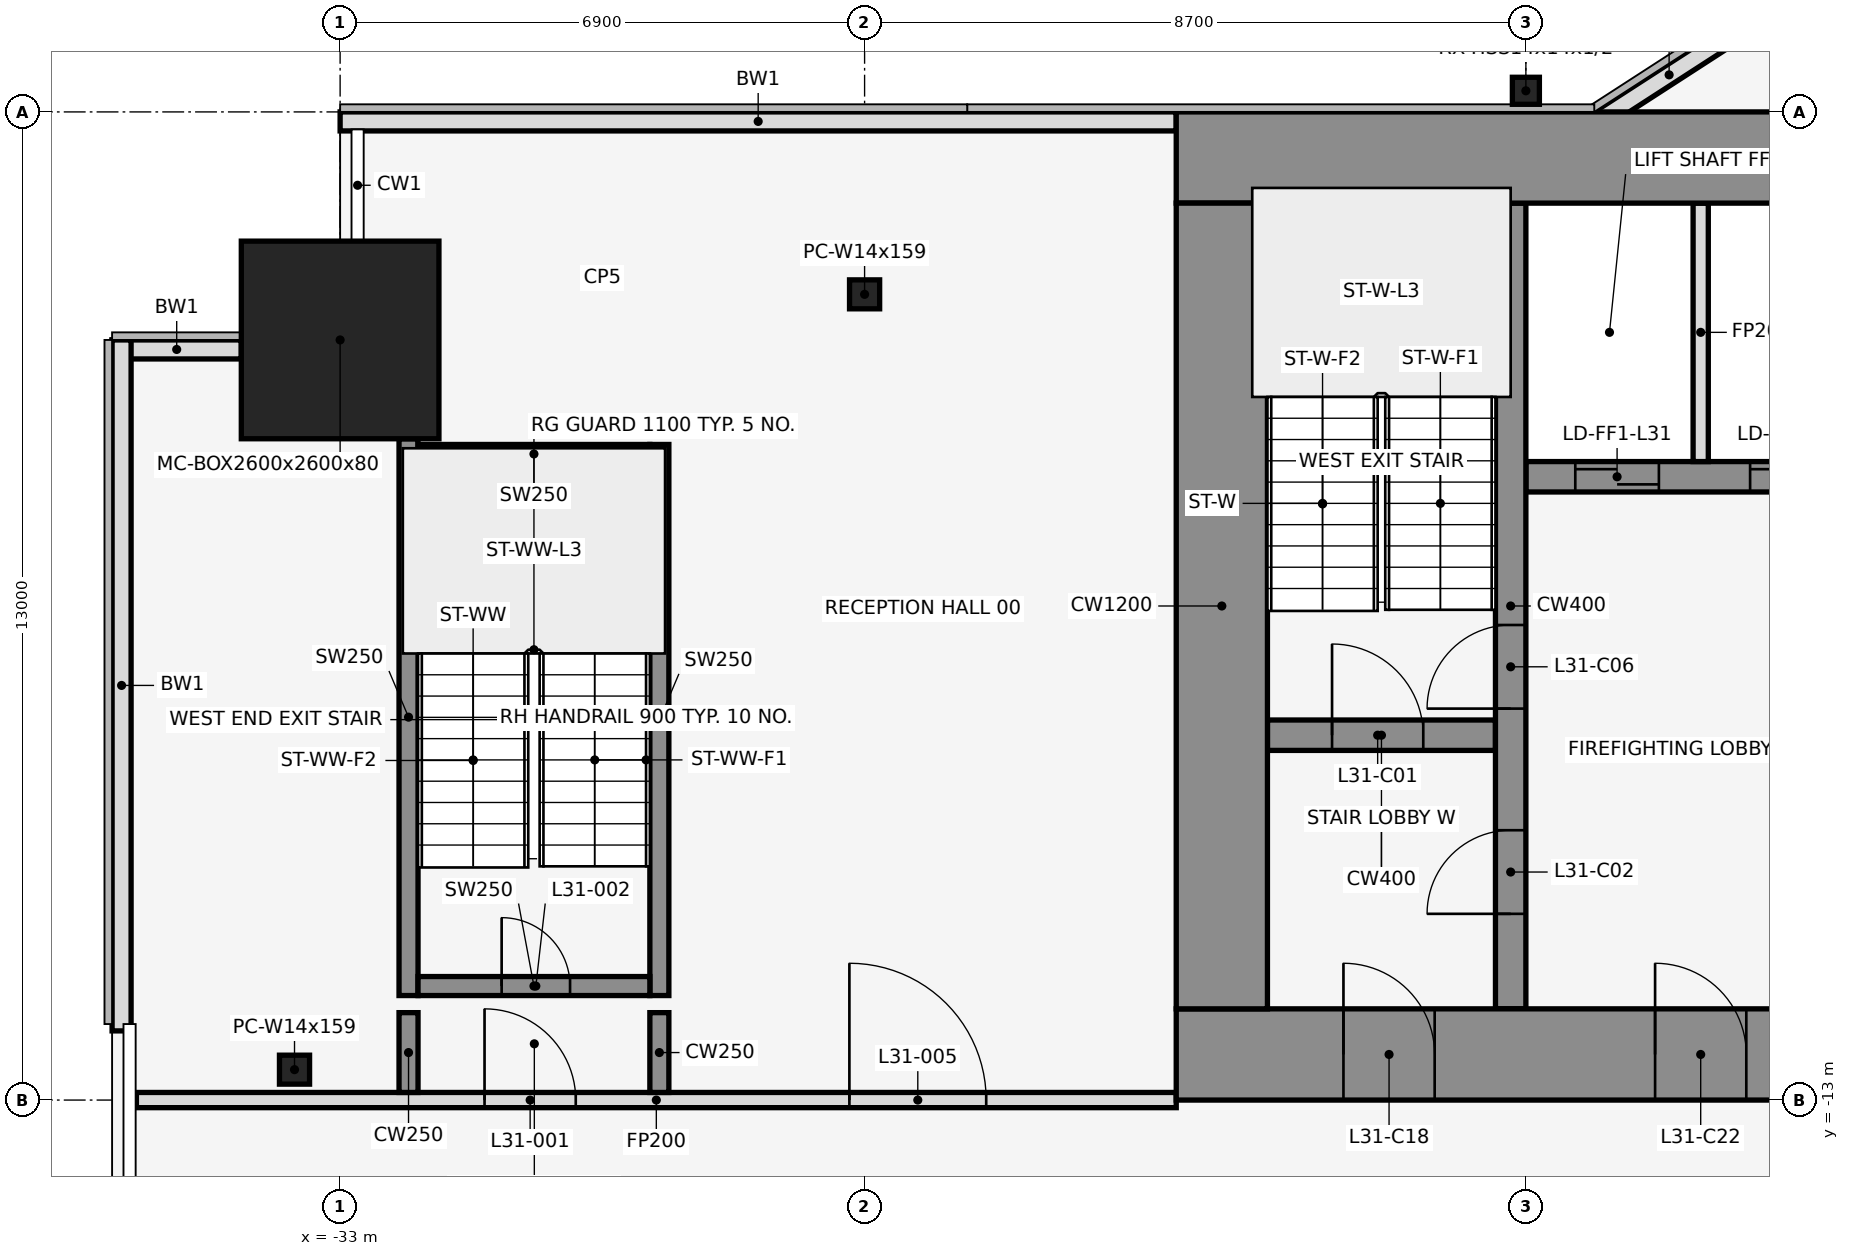
"""IFC4 building model, lengths in metres.
Left out: names, types, materials, properties, quantities, classifications, styles, units other than length and angle.
Written with IfcOpenShell. Run it as: python <this file> out.ifc"""

import sys

from ifc_helpers import new_model, si_unit, direction, frame, frame_2d, origin, origin_2d, place, context, subcontext, project, spatial, rectangle, hollow_rectangle, i_section, extrude, element, fill, save


model = new_model("IFC4")
c1 = context("Model", 3, precision=1e-05, world=origin(), true_north=direction((0.0, 1.0)))
c2 = subcontext(c1, "Body", "Model", "MODEL_VIEW")
j1 = project(units=[si_unit("LENGTHUNIT", "METRE"), si_unit("PLANEANGLEUNIT", "RADIAN")], contexts=[c1])
p1 = place(None, origin())
s1 = spatial("IfcSite", under=j1, at=p1, CompositionType="ELEMENT")
p2 = place(p1, origin())
s2 = spatial("IfcBuilding", under=s1, at=p2, CompositionType="ELEMENT")
p3 = place(p2, frame((0.0, 0.0, 144.5)))
s3 = spatial("IfcBuildingStorey", under=s2, at=p3, CompositionType="ELEMENT", Elevation=144.5)
p4 = place(p3, frame((-33.0, -3.0, 0.0), z_axis=(0.0, 0.0, 1.0), x_axis=(1.0, 0.0, 0.0)))
e1 = element("IfcColumn", 1, at=p4, inside=s3, PredefinedType="COLUMN", context=c2, shape_type="SweptSolid", body=[
    extrude(hollow_rectangle(XDim=2.6, YDim=2.6, WallThickness=0.08, at=origin_2d()), origin(), (0.0, 0.0, 1.0), 4.1),
])
p5 = place(p3, frame((-26.1, -2.4, 0.0), z_axis=(0.0, 0.0, 1.0), x_axis=(1.0, 0.0, 0.0)))
e2 = element("IfcColumn", 2, at=p5, inside=s3, PredefinedType="COLUMN", context=c2, shape_type="SweptSolid", body=[
    extrude(i_section(OverallWidth=0.396, OverallDepth=0.381, WebThickness=0.019, FlangeThickness=0.03, at=origin_2d()), origin(), (0.0, 0.0, 1.0), 4.1),
])
p6 = place(p3, frame((-17.4, 0.278, 0.0), z_axis=(0.0, 0.0, 1.0), x_axis=(1.0, 0.0, 0.0)))
e3 = element("IfcColumn", 3, at=p6, inside=s3, PredefinedType="COLUMN", context=c2, shape_type="SweptSolid", body=[
    extrude(hollow_rectangle(XDim=0.356, YDim=0.356, WallThickness=0.012, at=origin_2d()), origin(), (0.0, 0.0, 1.0), 4.1),
])
p7 = place(p3, frame((-33.6, -12.6, 0.0), z_axis=(0.0, 0.0, 1.0), x_axis=(1.0, 0.0, 0.0)))
e4 = element("IfcColumn", 4, at=p7, inside=s3, PredefinedType="COLUMN", context=c2, shape_type="SweptSolid", body=[
    extrude(i_section(OverallWidth=0.396, OverallDepth=0.381, WebThickness=0.019, FlangeThickness=0.03, at=origin_2d()), origin(), (0.0, 0.0, 1.0), 4.1),
])
p8 = place(p3, frame((-14.599, 1.08, 0.0), z_axis=(0.0, 0.0, 1.0), x_axis=(-0.83981312244, -0.542875602121, 0.0)))
e5 = element("IfcWall", 5, at=p8, inside=s3, PredefinedType="STANDARD", context=c2, shape_type="SweptSolid", body=[
    extrude(rectangle(XDim=2.183, YDim=0.25, at=frame_2d((1.091, 0.0))), origin(), (0.0, 0.0, 1.0), 3.95),
])
p9 = place(p3, frame((-22.0, -0.125, 0.0), z_axis=(0.0, 0.0, 1.0), x_axis=(-1.0, 0.0, 0.0)))
e6 = element("IfcWall", 6, at=p9, inside=s3, PredefinedType="STANDARD", context=c2, shape_type="SweptSolid", body=[
    extrude(rectangle(XDim=11.0, YDim=0.25, at=frame_2d((5.5, 0.0))), origin(), (0.0, 0.0, 1.0), 3.95),
])
p10 = place(p3, frame((-34.3, -3.125, 0.0), z_axis=(0.0, 0.0, 1.0), x_axis=(-1.0, 0.0, 0.0)))
e7 = element("IfcWall", 7, at=p10, inside=s3, PredefinedType="STANDARD", context=c2, shape_type="SweptSolid", body=[
    extrude(rectangle(XDim=1.7, YDim=0.25, at=frame_2d((0.85, 0.0))), origin(), (0.0, 0.0, 1.0), 3.95),
])
p11 = place(p3, frame((-35.875, -3.0, 0.0), z_axis=(0.0, 0.0, 1.0), x_axis=(0.0, -1.0, 0.0)))
e8 = element("IfcWall", 8, at=p11, inside=s3, PredefinedType="STANDARD", context=c2, shape_type="SweptSolid", body=[
    extrude(rectangle(XDim=9.09, YDim=0.25, at=frame_2d((4.545, 0.0))), origin(), (0.0, 0.0, 1.0), 3.95),
])
p12 = place(p3, frame((-32.1, -11.625, 0.0), z_axis=(0.0, 0.0, 1.0), x_axis=(0.0, 1.0, 0.0)))
e9 = element("IfcWall", 9, at=p12, inside=s3, PredefinedType="SHEAR", context=c2, shape_type="SweptSolid", body=[
    extrude(rectangle(XDim=7.325, YDim=0.25, at=frame_2d((3.663, 0.0))), origin(), (0.0, 0.0, 1.0), 4.1),
])
p13 = place(p3, frame((-28.8, -11.625, 0.0), z_axis=(0.0, 0.0, 1.0), x_axis=(0.0, 1.0, 0.0)))
e10 = element("IfcWall", 10, at=p13, inside=s3, PredefinedType="SHEAR", context=c2, shape_type="SweptSolid", body=[
    extrude(rectangle(XDim=7.25, YDim=0.25, at=frame_2d((3.625, 0.0))), origin(), (0.0, 0.0, 1.0), 4.1),
])
p14 = place(p3, frame((-31.975, -11.5, 0.0), z_axis=(0.0, 0.0, 1.0), x_axis=(1.0, 0.0, 0.0)))
e11 = element("IfcWall", 11, at=p14, inside=s3, PredefinedType="SHEAR", context=c2, shape_type="SweptSolid", body=[
    extrude(rectangle(XDim=3.05, YDim=0.25, at=frame_2d((1.525, 0.0))), origin(), (0.0, 0.0, 1.0), 4.1),
])
p15 = place(p14, frame((1.1, 0.0, 0.0)))
e12 = element("IfcOpeningElement", 12, at=p15, cuts=e11, PredefinedType="OPENING", context=c2, shape_type="SweptSolid", body=[
    extrude(rectangle(XDim=0.9, YDim=2.1, at=frame_2d((0.45, 1.05))), frame((0.0, 0.137, 0.0), z_axis=(0.0, -1.0, 0.0), x_axis=(1.0, 0.0, 0.0)), (0.0, 0.0, 1.0), 0.274),
])
p16 = place(p3, frame((-31.975, -4.5, 0.0), z_axis=(0.0, 0.0, 1.0), x_axis=(1.0, 0.0, 0.0)))
e13 = element("IfcWall", 13, at=p16, inside=s3, PredefinedType="SHEAR", context=c2, shape_type="SweptSolid", body=[
    extrude(rectangle(XDim=3.05, YDim=0.25, at=frame_2d((1.525, 0.0))), origin(), (0.0, 0.0, 1.0), 4.1),
])
p17 = place(p3, frame((-35.68, -13.0, 0.0), z_axis=(0.0, 0.0, 1.0), x_axis=(1.0, 0.0, 0.0)))
e14 = element("IfcWall", 14, at=p17, inside=s3, PredefinedType="PARTITIONING", context=c2, shape_type="SweptSolid", body=[
    extrude(rectangle(XDim=13.68, YDim=0.2, at=frame_2d((6.84, 0.0))), origin(), (0.0, 0.0, 1.0), 2.84),
])
p18 = place(p17, frame((4.58, 0.0, 0.0)))
e15 = element("IfcOpeningElement", 15, at=p18, cuts=e14, PredefinedType="OPENING", context=c2, shape_type="SweptSolid", body=[
    extrude(rectangle(XDim=1.2, YDim=2.1, at=frame_2d((0.6, 1.05))), frame((0.0, 0.112, 0.0), z_axis=(0.0, -1.0, 0.0), x_axis=(1.0, 0.0, 0.0)), (0.0, 0.0, 1.0), 0.224),
])
p19 = place(p17, frame((9.38, 0.0, 0.0)))
e16 = element("IfcOpeningElement", 16, at=p19, cuts=e14, PredefinedType="OPENING", context=c2, shape_type="SweptSolid", body=[
    extrude(rectangle(XDim=1.8, YDim=2.1, at=frame_2d((0.9, 1.05))), frame((0.0, 0.112, 0.0), z_axis=(0.0, -1.0, 0.0), x_axis=(1.0, 0.0, 0.0)), (0.0, 0.0, 1.0), 0.224),
])
for number, where, z_axis, x_axis in (
    (17, (-32.1, -12.9, 0.0), (0.0, 0.0, 1.0), (0.0, 1.0, 0.0)),
    (18, (-28.8, -12.9, 0.0), (0.0, 0.0, 1.0), (0.0, 1.0, 0.0)),
):
    element("IfcWall", number, at=place(p3, frame(where, z_axis=z_axis, x_axis=x_axis)), inside=s3, PredefinedType="SHEAR", context=c2, shape_type="SweptSolid", body=[
        extrude(rectangle(XDim=1.05, YDim=0.25, at=frame_2d((0.525, 0.0))), origin(), (0.0, 0.0, 1.0), 4.1),
    ])
p20 = place(p3, frame((-20.8, -8.2, 0.0), z_axis=(0.0, 0.0, 1.0), x_axis=(1.0, 0.0, 0.0)))
e19 = element("IfcWall", 19, at=p20, inside=s3, PredefinedType="SHEAR", context=c2, shape_type="SweptSolid", body=[
    extrude(rectangle(XDim=3.0, YDim=0.4, at=frame_2d((1.5, 0.0))), origin(), (0.0, 0.0, 1.0), 4.1),
])
p21 = place(p20, frame((0.85, 0.0, 0.0)))
e20 = element("IfcOpeningElement", 20, at=p21, cuts=e19, PredefinedType="OPENING", context=c2, shape_type="SweptSolid", body=[
    extrude(rectangle(XDim=1.2, YDim=2.1, at=frame_2d((0.6, 1.05))), frame((0.0, 0.212, 0.0), z_axis=(0.0, -1.0, 0.0), x_axis=(1.0, 0.0, 0.0)), (0.0, 0.0, 1.0), 0.424),
])
p22 = place(p3, frame((-17.4, -4.8, 0.0), z_axis=(0.0, 0.0, 1.0), x_axis=(1.0, 0.0, 0.0)))
e21 = element("IfcWall", 21, at=p22, inside=s3, PredefinedType="SHEAR", context=c2, shape_type="SweptSolid", body=[
    extrude(rectangle(XDim=13.6, YDim=0.4, at=frame_2d((6.8, 0.0))), origin(), (0.0, 0.0, 1.0), 4.1),
])
p23 = place(p22, frame((0.65, 0.0, 0.0)))
e22 = element("IfcOpeningElement", 22, at=p23, cuts=e21, PredefinedType="OPENING", context=c2, shape_type="SweptSolid", body=[
    extrude(rectangle(XDim=1.1, YDim=2.1, at=frame_2d((0.55, 1.05))), frame((0.0, 0.212, 0.0), z_axis=(0.0, -1.0, 0.0), x_axis=(1.0, 0.0, 0.0)), (0.0, 0.0, 1.0), 0.424),
])
p24 = place(p22, frame((2.95, 0.0, 0.0)))
e23 = element("IfcOpeningElement", 23, at=p24, cuts=e21, PredefinedType="OPENING", context=c2, shape_type="SweptSolid", body=[
    extrude(rectangle(XDim=1.1, YDim=2.1, at=frame_2d((0.55, 1.05))), frame((0.0, 0.212, 0.0), z_axis=(0.0, -1.0, 0.0), x_axis=(1.0, 0.0, 0.0)), (0.0, 0.0, 1.0), 0.424),
])
p25 = place(p22, frame((8.75, 0.0, 0.0)))
e24 = element("IfcOpeningElement", 24, at=p25, cuts=e21, PredefinedType="OPENING", context=c2, shape_type="SweptSolid", body=[
    extrude(rectangle(XDim=0.9, YDim=2.1, at=frame_2d((0.45, 1.05))), frame((0.0, 0.212, 0.0), z_axis=(0.0, -1.0, 0.0), x_axis=(1.0, 0.0, 0.0)), (0.0, 0.0, 1.0), 0.424),
])
p26 = place(p3, frame((-17.6, -11.8, 0.0), z_axis=(0.0, 0.0, 1.0), x_axis=(0.0, 1.0, 0.0)))
e25 = element("IfcWall", 25, at=p26, inside=s3, PredefinedType="SHEAR", context=c2, shape_type="SweptSolid", body=[
    extrude(rectangle(XDim=10.6, YDim=0.4, at=frame_2d((5.3, 0.0))), origin(), (0.0, 0.0, 1.0), 4.1),
])
p27 = place(p26, frame((1.25, 0.0, 0.0)))
e26 = element("IfcOpeningElement", 26, at=p27, cuts=e25, PredefinedType="OPENING", context=c2, shape_type="SweptSolid", body=[
    extrude(rectangle(XDim=1.1, YDim=2.1, at=frame_2d((0.55, 1.05))), frame((0.0, 0.212, 0.0), z_axis=(0.0, -1.0, 0.0), x_axis=(1.0, 0.0, 0.0)), (0.0, 0.0, 1.0), 0.424),
])
p28 = place(p26, frame((3.95, 0.0, 0.0)))
e27 = element("IfcOpeningElement", 27, at=p28, cuts=e25, PredefinedType="OPENING", context=c2, shape_type="SweptSolid", body=[
    extrude(rectangle(XDim=1.1, YDim=2.1, at=frame_2d((0.55, 1.05))), frame((0.0, 0.212, 0.0), z_axis=(0.0, -1.0, 0.0), x_axis=(1.0, 0.0, 0.0)), (0.0, 0.0, 1.0), 0.424),
])
p29 = place(p3, frame((-15.1, -4.6, 0.0), z_axis=(0.0, 0.0, 1.0), x_axis=(0.0, 1.0, 0.0)))
e28 = element("IfcWall", 28, at=p29, inside=s3, PredefinedType="PARTITIONING", context=c2, shape_type="SweptSolid", body=[
    extrude(rectangle(XDim=3.4, YDim=0.2, at=frame_2d((1.7, 0.0))), origin(), (0.0, 0.0, 1.0), 2.84),
])
p30 = place(p3, frame((-22.0, -0.6, 0.0), z_axis=(0.0, 0.0, 1.0), x_axis=(1.0, 0.0, 0.0)))
e29 = element("IfcWall", 29, at=p30, inside=s3, PredefinedType="SHEAR", context=c2, shape_type="SweptSolid", body=[
    extrude(rectangle(XDim=44.0, YDim=1.2, at=frame_2d((22.0, 0.0))), origin(), (0.0, 0.0, 1.0), 4.1),
])
p31 = place(p30, frame((18.55, 0.0, 0.0)))
e30 = element("IfcOpeningElement", 30, at=p31, cuts=e29, PredefinedType="OPENING", context=c2, shape_type="SweptSolid", body=[
    extrude(rectangle(XDim=0.9, YDim=2.1, at=frame_2d((0.45, 1.05))), frame((0.0, 0.612, 0.0), z_axis=(0.0, -1.0, 0.0), x_axis=(1.0, 0.0, 0.0)), (0.0, 0.0, 1.0), 1.224),
])
p32 = place(p30, frame((24.55, 0.0, 0.0)))
e31 = element("IfcOpeningElement", 31, at=p32, cuts=e29, PredefinedType="OPENING", context=c2, shape_type="SweptSolid", body=[
    extrude(rectangle(XDim=0.9, YDim=2.1, at=frame_2d((0.45, 1.05))), frame((0.0, 0.612, 0.0), z_axis=(0.0, -1.0, 0.0), x_axis=(1.0, 0.0, 0.0)), (0.0, 0.0, 1.0), 1.224),
])
p33 = place(p3, frame((-22.0, -12.4, 0.0), z_axis=(0.0, 0.0, 1.0), x_axis=(1.0, 0.0, 0.0)))
e32 = element("IfcWall", 32, at=p33, inside=s3, PredefinedType="SHEAR", context=c2, shape_type="SweptSolid", body=[
    extrude(rectangle(XDim=44.0, YDim=1.2, at=frame_2d((22.0, 0.0))), origin(), (0.0, 0.0, 1.0), 4.1),
])
p34 = place(p33, frame((2.2, 0.0, 0.0)))
e33 = element("IfcOpeningElement", 33, at=p34, cuts=e32, PredefinedType="OPENING", context=c2, shape_type="SweptSolid", body=[
    extrude(rectangle(XDim=1.2, YDim=2.1, at=frame_2d((0.6, 1.05))), frame((0.0, 0.612, 0.0), z_axis=(0.0, -1.0, 0.0), x_axis=(1.0, 0.0, 0.0)), (0.0, 0.0, 1.0), 1.224),
])
p35 = place(p33, frame((21.4, 0.0, 0.0)))
e34 = element("IfcOpeningElement", 34, at=p35, cuts=e32, PredefinedType="OPENING", context=c2, shape_type="SweptSolid", body=[
    extrude(rectangle(XDim=1.2, YDim=2.1, at=frame_2d((0.6, 1.05))), frame((0.0, 0.612, 0.0), z_axis=(0.0, -1.0, 0.0), x_axis=(1.0, 0.0, 0.0)), (0.0, 0.0, 1.0), 1.224),
])
p36 = place(p33, frame((40.6, 0.0, 0.0)))
e35 = element("IfcOpeningElement", 35, at=p36, cuts=e32, PredefinedType="OPENING", context=c2, shape_type="SweptSolid", body=[
    extrude(rectangle(XDim=1.2, YDim=2.1, at=frame_2d((0.6, 1.05))), frame((0.0, 0.612, 0.0), z_axis=(0.0, -1.0, 0.0), x_axis=(1.0, 0.0, 0.0)), (0.0, 0.0, 1.0), 1.224),
])
p37 = place(p33, frame((16.0, 0.0, 0.0)))
e36 = element("IfcOpeningElement", 36, at=p37, cuts=e32, PredefinedType="OPENING", context=c2, shape_type="SweptSolid", body=[
    extrude(rectangle(XDim=1.8, YDim=2.1, at=frame_2d((0.9, 1.05))), frame((0.0, 0.612, 0.0), z_axis=(0.0, -1.0, 0.0), x_axis=(1.0, 0.0, 0.0)), (0.0, 0.0, 1.0), 1.224),
])
p38 = place(p33, frame((6.3, 0.0, 0.0)))
e37 = element("IfcOpeningElement", 37, at=p38, cuts=e32, PredefinedType="OPENING", context=c2, shape_type="SweptSolid", body=[
    extrude(rectangle(XDim=1.2, YDim=2.1, at=frame_2d((0.6, 1.05))), frame((0.0, 0.612, 0.0), z_axis=(0.0, -1.0, 0.0), x_axis=(1.0, 0.0, 0.0)), (0.0, 0.0, 1.0), 1.224),
])
p39 = place(p33, frame((26.2, 0.0, 0.0)))
e38 = element("IfcOpeningElement", 38, at=p39, cuts=e32, PredefinedType="OPENING", context=c2, shape_type="SweptSolid", body=[
    extrude(rectangle(XDim=1.8, YDim=2.1, at=frame_2d((0.9, 1.05))), frame((0.0, 0.612, 0.0), z_axis=(0.0, -1.0, 0.0), x_axis=(1.0, 0.0, 0.0)), (0.0, 0.0, 1.0), 1.224),
])
p40 = place(p33, frame((36.5, 0.0, 0.0)))
e39 = element("IfcOpeningElement", 39, at=p40, cuts=e32, PredefinedType="OPENING", context=c2, shape_type="SweptSolid", body=[
    extrude(rectangle(XDim=1.2, YDim=2.1, at=frame_2d((0.6, 1.05))), frame((0.0, 0.612, 0.0), z_axis=(0.0, -1.0, 0.0), x_axis=(1.0, 0.0, 0.0)), (0.0, 0.0, 1.0), 1.224),
])
p41 = place(p3, frame((-21.4, -11.8, 0.0), z_axis=(0.0, 0.0, 1.0), x_axis=(0.0, 1.0, 0.0)))
e40 = element("IfcWall", 40, at=p41, inside=s3, PredefinedType="SHEAR", context=c2, shape_type="SweptSolid", body=[
    extrude(rectangle(XDim=10.6, YDim=1.2, at=frame_2d((5.3, 0.0))), origin(), (0.0, 0.0, 1.0), 4.1),
])
p42 = place(p18, origin())
e41 = element("IfcDoor", 41, at=p42, inside=s3, OperationType="SINGLE_SWING_LEFT", PredefinedType="DOOR", context=c2, shape_type="SweptSolid", body=[
    extrude(rectangle(XDim=1.2, YDim=2.1, at=frame_2d((0.6, 1.05))), frame((0.0, 0.025, 0.0), z_axis=(0.0, -1.0, 0.0), x_axis=(1.0, 0.0, 0.0)), (0.0, 0.0, 1.0), 0.05),
])
fill(e15, e41)
p43 = place(p15, origin())
e42 = element("IfcDoor", 42, at=p43, inside=s3, OperationType="SINGLE_SWING_LEFT", PredefinedType="DOOR", context=c2, shape_type="SweptSolid", body=[
    extrude(rectangle(XDim=0.9, YDim=2.1, at=frame_2d((0.45, 1.05))), frame((0.0, 0.025, 0.0), z_axis=(0.0, -1.0, 0.0), x_axis=(1.0, 0.0, 0.0)), (0.0, 0.0, 1.0), 0.05),
])
fill(e12, e42)
p44 = place(p19, origin())
e43 = element("IfcDoor", 43, at=p44, inside=s3, OperationType="SINGLE_SWING_LEFT", PredefinedType="DOOR", context=c2, shape_type="SweptSolid", body=[
    extrude(rectangle(XDim=1.8, YDim=2.1, at=frame_2d((0.9, 1.05))), frame((0.0, 0.025, 0.0), z_axis=(0.0, -1.0, 0.0), x_axis=(1.0, 0.0, 0.0)), (0.0, 0.0, 1.0), 0.05),
])
fill(e16, e43)
p45 = place(p21, origin())
e44 = element("IfcDoor", 44, at=p45, inside=s3, OperationType="SINGLE_SWING_LEFT", PredefinedType="DOOR", context=c2, shape_type="SweptSolid", body=[
    extrude(rectangle(XDim=1.2, YDim=2.1, at=frame_2d((0.6, 1.05))), frame((0.0, 0.025, 0.0), z_axis=(0.0, -1.0, 0.0), x_axis=(1.0, 0.0, 0.0)), (0.0, 0.0, 1.0), 0.05),
])
fill(e20, e44)
p46 = place(p27, frame((1.1, 0.0, 0.0), z_axis=(0.0, 0.0, 1.0), x_axis=(-1.0, 0.0, 0.0)))
e45 = element("IfcDoor", 45, at=p46, inside=s3, OperationType="SINGLE_SWING_LEFT", PredefinedType="DOOR", context=c2, shape_type="SweptSolid", body=[
    extrude(rectangle(XDim=1.1, YDim=2.1, at=frame_2d((0.55, 1.05))), frame((0.0, 0.025, 0.0), z_axis=(0.0, -1.0, 0.0), x_axis=(1.0, 0.0, 0.0)), (0.0, 0.0, 1.0), 0.05),
])
fill(e26, e45)
p47 = place(p23, origin())
e46 = element("IfcDoor", 46, at=p47, inside=s3, OperationType="DOUBLE_DOOR_SLIDING", PredefinedType="DOOR", context=c2, shape_type="SweptSolid", body=[
    extrude(rectangle(XDim=1.1, YDim=2.1, at=frame_2d((0.55, 1.05))), frame((0.0, 0.025, 0.0), z_axis=(0.0, -1.0, 0.0), x_axis=(1.0, 0.0, 0.0)), (0.0, 0.0, 1.0), 0.05),
])
fill(e22, e46)
p48 = place(p24, origin())
e47 = element("IfcDoor", 47, at=p48, inside=s3, OperationType="DOUBLE_DOOR_SLIDING", PredefinedType="DOOR", context=c2, shape_type="SweptSolid", body=[
    extrude(rectangle(XDim=1.1, YDim=2.1, at=frame_2d((0.55, 1.05))), frame((0.0, 0.025, 0.0), z_axis=(0.0, -1.0, 0.0), x_axis=(1.0, 0.0, 0.0)), (0.0, 0.0, 1.0), 0.05),
])
fill(e23, e47)
p49 = place(p28, frame((1.1, 0.0, 0.0), z_axis=(0.0, 0.0, 1.0), x_axis=(-1.0, 0.0, 0.0)))
e48 = element("IfcDoor", 48, at=p49, inside=s3, OperationType="SINGLE_SWING_LEFT", PredefinedType="DOOR", context=c2, shape_type="SweptSolid", body=[
    extrude(rectangle(XDim=1.1, YDim=2.1, at=frame_2d((0.55, 1.05))), frame((0.0, 0.025, 0.0), z_axis=(0.0, -1.0, 0.0), x_axis=(1.0, 0.0, 0.0)), (0.0, 0.0, 1.0), 0.05),
])
fill(e27, e48)
p50 = place(p34, frame((1.2, 0.0, 0.0), z_axis=(0.0, 0.0, 1.0), x_axis=(-1.0, 0.0, 0.0)))
e49 = element("IfcDoor", 49, at=p50, inside=s3, OperationType="SINGLE_SWING_RIGHT", PredefinedType="DOOR", context=c2, shape_type="SweptSolid", body=[
    extrude(rectangle(XDim=1.2, YDim=2.1, at=frame_2d((0.6, 1.05))), frame((0.0, 0.025, 0.0), z_axis=(0.0, -1.0, 0.0), x_axis=(1.0, 0.0, 0.0)), (0.0, 0.0, 1.0), 0.05),
])
fill(e33, e49)
p51 = place(p38, frame((1.2, 0.0, 0.0), z_axis=(0.0, 0.0, 1.0), x_axis=(-1.0, 0.0, 0.0)))
e50 = element("IfcDoor", 50, at=p51, inside=s3, OperationType="SINGLE_SWING_RIGHT", PredefinedType="DOOR", context=c2, shape_type="SweptSolid", body=[
    extrude(rectangle(XDim=1.2, YDim=2.1, at=frame_2d((0.6, 1.05))), frame((0.0, 0.025, 0.0), z_axis=(0.0, -1.0, 0.0), x_axis=(1.0, 0.0, 0.0)), (0.0, 0.0, 1.0), 0.05),
])
fill(e37, e50)
save(model, sys.argv[1])
